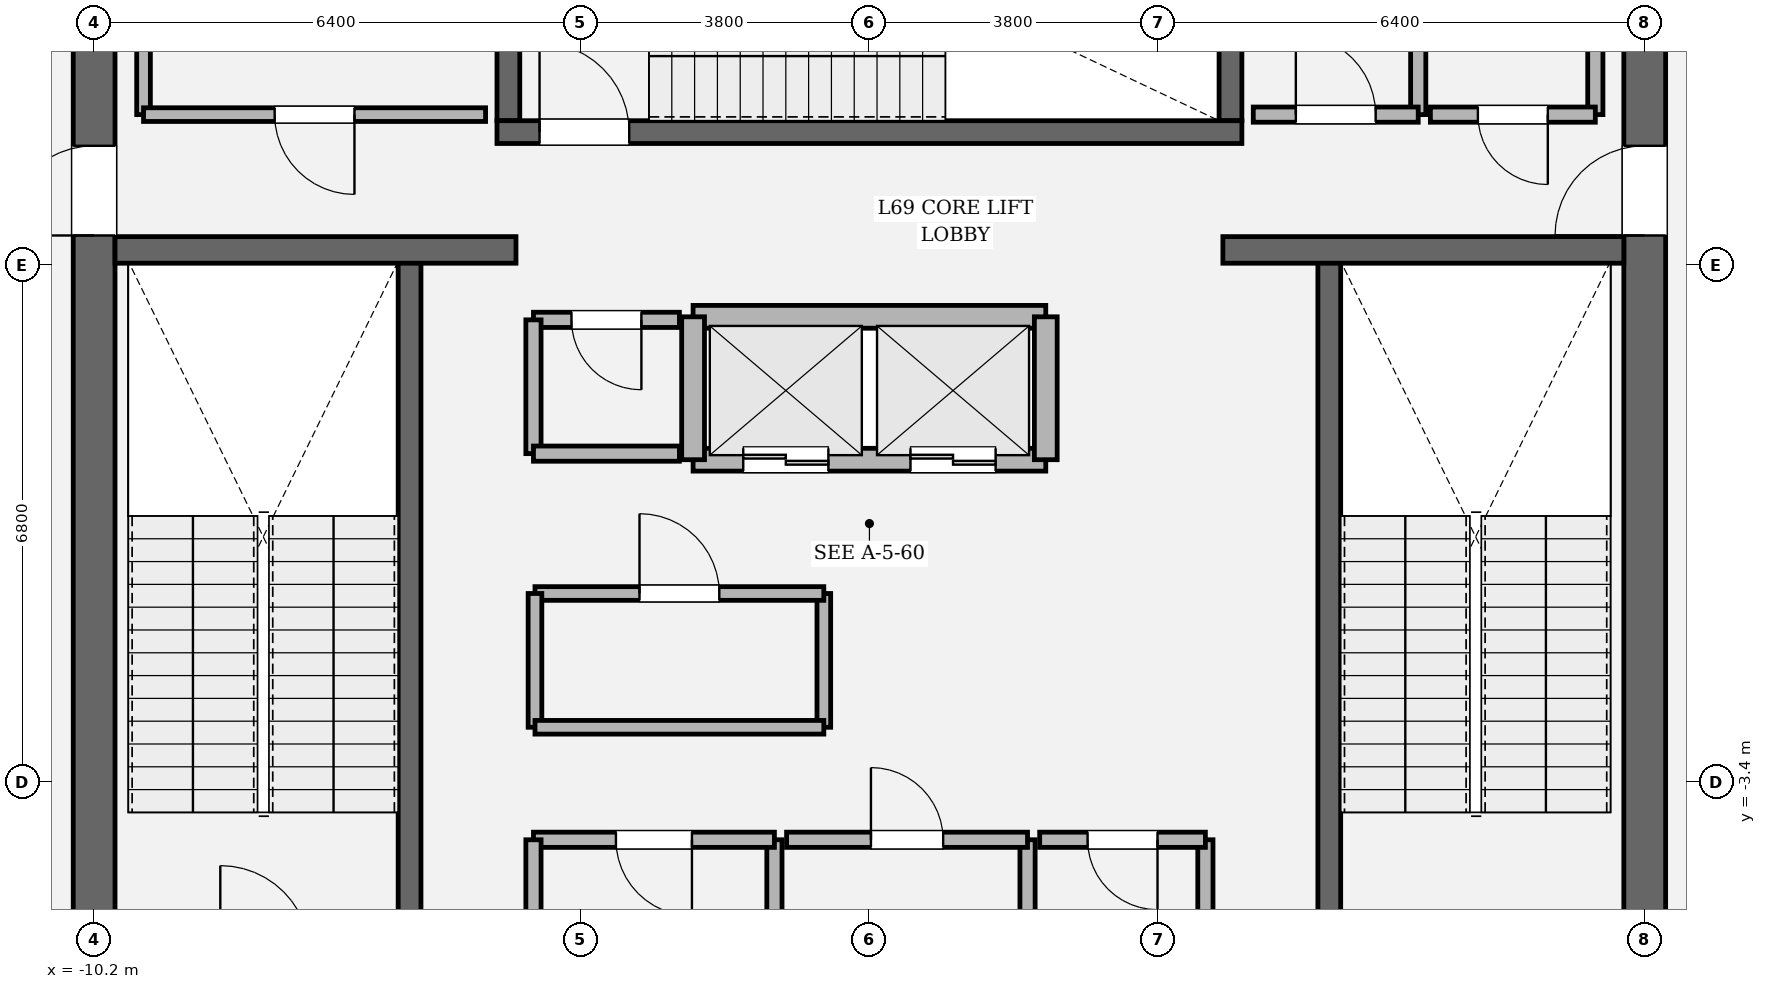
"""IFC4 building model, lengths in metres.
Left out: names, types, materials, properties, quantities, classifications, styles, units other than length and angle.
Written with IfcOpenShell. Run it as: python <this file> out.ifc"""

import sys

from ifc_helpers import new_model, si_unit, direction, frame, frame_2d, origin, place, context, subcontext, project, spatial, rectangle, extrude, element, fill, save


model = new_model("IFC4")
c1 = context("Model", 3, precision=1e-05, world=origin(), true_north=direction((0.0, 1.0)))
c2 = subcontext(c1, "Body", "Model", "MODEL_VIEW")
j1 = project(units=[si_unit("LENGTHUNIT", "METRE"), si_unit("PLANEANGLEUNIT", "RADIAN")], contexts=[c1])
p1 = place(None, origin())
s1 = spatial("IfcSite", under=j1, at=p1, CompositionType="ELEMENT")
p2 = place(p1, origin())
s2 = spatial("IfcBuilding", under=s1, at=p2, CompositionType="ELEMENT")
p3 = place(p2, frame((0.0, 0.0, 292.2)))
s3 = spatial("IfcBuildingStorey", under=s2, at=p3, CompositionType="ELEMENT", Elevation=292.2)
p4 = place(p3, frame((-10.2, -8.925, 0.0), z_axis=(0.0, 0.0, 1.0), x_axis=(0.0, 1.0, 0.0)))
e1 = element("IfcWall", 1, at=p4, inside=s3, PredefinedType="SHEAR", context=c2, shape_type="SweptSolid", body=[
    extrude(rectangle(XDim=17.85, YDim=0.55, at=frame_2d((8.925, 0.0))), origin(), (0.0, 0.0, 1.0), 4.2),
])
p5 = place(p4, frame((12.715, 0.0, 0.0)))
e2 = element("IfcOpeningElement", 2, at=p5, cuts=e1, PredefinedType="OPENING", context=c2, shape_type="SweptSolid", body=[
    extrude(rectangle(XDim=1.18, YDim=2.2, at=frame_2d((0.59, 1.1))), frame((0.0, 0.285, 0.0), z_axis=(0.0, -1.0, 0.0), x_axis=(1.0, 0.0, 0.0)), (0.0, 0.0, 1.0), 0.57),
])
p6 = place(p3, frame((10.2, 8.925, 0.0), z_axis=(0.0, 0.0, 1.0), x_axis=(0.0, -1.0, 0.0)))
e3 = element("IfcWall", 3, at=p6, inside=s3, PredefinedType="SHEAR", context=c2, shape_type="SweptSolid", body=[
    extrude(rectangle(XDim=17.85, YDim=0.55, at=frame_2d((8.925, 0.0))), origin(), (0.0, 0.0, 1.0), 4.2),
])
p7 = place(p6, frame((3.955, 0.0, 0.0)))
e4 = element("IfcOpeningElement", 4, at=p7, cuts=e3, PredefinedType="OPENING", context=c2, shape_type="SweptSolid", body=[
    extrude(rectangle(XDim=1.18, YDim=2.2, at=frame_2d((0.59, 1.1))), frame((0.0, 0.285, 0.0), z_axis=(0.0, -1.0, 0.0), x_axis=(1.0, 0.0, 0.0)), (0.0, 0.0, 1.0), 0.57),
])
for number, where, z_axis, x_axis in (
    (5, (-6.05, -5.5, 0.0), (0.0, 0.0, 1.0), (0.0, 1.0, 0.0)),
    (6, (6.05, 3.45, 0.0), (0.0, 0.0, 1.0), (0.0, -1.0, 0.0)),
):
    element("IfcWall", number, at=place(p3, frame(where, z_axis=z_axis, x_axis=x_axis)), inside=s3, PredefinedType="SOLIDWALL", context=c2, shape_type="SweptSolid", body=[
        extrude(rectangle(XDim=8.95, YDim=0.3, at=frame_2d((4.475, 0.0))), origin(), (0.0, 0.0, 1.0), 4.2),
    ])
for number, where, z_axis, x_axis in (
    (7, (-4.75, 5.3, 0.0), (0.0, 0.0, 1.0), (0.0, 1.0, 0.0)),
    (8, (4.75, 8.925, 0.0), (0.0, 0.0, 1.0), (0.0, -1.0, 0.0)),
):
    element("IfcWall", number, at=place(p3, frame(where, z_axis=z_axis, x_axis=x_axis)), inside=s3, PredefinedType="SOLIDWALL", context=c2, shape_type="SweptSolid", body=[
        extrude(rectangle(XDim=3.625, YDim=0.3, at=frame_2d((1.812, 0.0))), origin(), (0.0, 0.0, 1.0), 4.2),
    ])
p8 = place(p3, frame((-4.9, 5.15, 0.0), z_axis=(0.0, 0.0, 1.0), x_axis=(1.0, 0.0, 0.0)))
e9 = element("IfcWall", 9, at=p8, inside=s3, PredefinedType="SOLIDWALL", context=c2, shape_type="SweptSolid", body=[
    extrude(rectangle(XDim=9.8, YDim=0.3, at=frame_2d((4.9, 0.0))), origin(), (0.0, 0.0, 1.0), 4.2),
])
p9 = place(p8, frame((0.56, 0.0, 0.0)))
e10 = element("IfcOpeningElement", 10, at=p9, cuts=e9, PredefinedType="OPENING", context=c2, shape_type="SweptSolid", body=[
    extrude(rectangle(XDim=1.18, YDim=2.2, at=frame_2d((0.59, 1.1))), frame((0.0, 0.16, 0.0), z_axis=(0.0, -1.0, 0.0), x_axis=(1.0, 0.0, 0.0)), (0.0, 0.0, 1.0), 0.32),
])
for number, where, z_axis, x_axis in (
    (11, (-9.925, 3.6, 0.0), (0.0, 0.0, 1.0), (1.0, 0.0, 0.0)),
    (12, (4.65, 3.6, 0.0), (0.0, 0.0, 1.0), (1.0, 0.0, 0.0)),
):
    element("IfcWall", number, at=place(p3, frame(where, z_axis=z_axis, x_axis=x_axis)), inside=s3, PredefinedType="SOLIDWALL", context=c2, shape_type="SweptSolid", body=[
        extrude(rectangle(XDim=5.275, YDim=0.35, at=frame_2d((2.638, 0.0))), origin(), (0.0, 0.0, 1.0), 4.2),
    ])
p10 = place(p3, frame((-2.32, 0.84, 0.0), z_axis=(0.0, 0.0, 1.0), x_axis=(1.0, 0.0, 0.0)))
e13 = element("IfcWall", 13, at=p10, inside=s3, PredefinedType="SOLIDWALL", context=c2, shape_type="SweptSolid", body=[
    extrude(rectangle(XDim=4.64, YDim=0.3, at=frame_2d((2.32, 0.0))), origin(), (0.0, 0.0, 1.0), 4.0),
])
p11 = place(p10, frame((0.66, 0.0, 0.0)))
e14 = element("IfcOpeningElement", 14, at=p11, cuts=e13, PredefinedType="OPENING", context=c2, shape_type="SweptSolid", body=[
    extrude(rectangle(XDim=1.12, YDim=2.25, at=frame_2d((0.56, 1.125))), frame((0.0, 0.16, 0.0), z_axis=(0.0, -1.0, 0.0), x_axis=(1.0, 0.0, 0.0)), (0.0, 0.0, 1.0), 0.32),
])
p12 = place(p10, frame((2.86, 0.0, 0.0)))
e15 = element("IfcOpeningElement", 15, at=p12, cuts=e13, PredefinedType="OPENING", context=c2, shape_type="SweptSolid", body=[
    extrude(rectangle(XDim=1.12, YDim=2.25, at=frame_2d((0.56, 1.125))), frame((0.0, 0.16, 0.0), z_axis=(0.0, -1.0, 0.0), x_axis=(1.0, 0.0, 0.0)), (0.0, 0.0, 1.0), 0.32),
])
p13 = place(p3, frame((-2.32, 2.72, 0.0), z_axis=(0.0, 0.0, 1.0), x_axis=(1.0, 0.0, 0.0)))
e16 = element("IfcWall", 16, at=p13, inside=s3, PredefinedType="SOLIDWALL", context=c2, shape_type="SweptSolid", body=[
    extrude(rectangle(XDim=4.64, YDim=0.3, at=frame_2d((2.32, 0.0))), origin(), (0.0, 0.0, 1.0), 4.0),
])
for number, where, z_axis, x_axis in (
    (17, (-2.32, 0.84, 0.0), (0.0, 0.0, 1.0), (0.0, 1.0, 0.0)),
    (18, (2.32, 0.84, 0.0), (0.0, 0.0, 1.0), (0.0, 1.0, 0.0)),
):
    element("IfcWall", number, at=place(p3, frame(where, z_axis=z_axis, x_axis=x_axis)), inside=s3, PredefinedType="SOLIDWALL", context=c2, shape_type="SweptSolid", body=[
        extrude(rectangle(XDim=1.88, YDim=0.3, at=frame_2d((0.94, 0.0))), origin(), (0.0, 0.0, 1.0), 4.0),
    ])
p14 = place(p3, frame((-1.25, -5.9, 0.0), z_axis=(0.0, 0.0, 1.0), x_axis=(0.0, 1.0, 0.0)))
e19 = element("IfcWall", 19, at=p14, inside=s3, PredefinedType="SOLIDWALL", context=c2, shape_type="SweptSolid", body=[
    extrude(rectangle(XDim=1.74, YDim=0.2, at=frame_2d((0.87, 0.0))), origin(), (0.0, 0.0, 1.0), 4.0),
])
p15 = place(p3, frame((-1.25, -4.16, 0.0), z_axis=(0.0, 0.0, 1.0), x_axis=(-1.0, 0.0, 0.0)))
e20 = element("IfcWall", 20, at=p15, inside=s3, PredefinedType="SOLIDWALL", context=c2, shape_type="SweptSolid", body=[
    extrude(rectangle(XDim=3.17, YDim=0.2, at=frame_2d((1.585, 0.0))), origin(), (0.0, 0.0, 1.0), 4.0),
])
p16 = place(p15, frame((1.085, 0.0, 0.0)))
e21 = element("IfcOpeningElement", 21, at=p16, cuts=e20, PredefinedType="OPENING", context=c2, shape_type="SweptSolid", body=[
    extrude(rectangle(XDim=1.0, YDim=2.15, at=frame_2d((0.5, 1.075))), frame((0.0, 0.11, 0.0), z_axis=(0.0, -1.0, 0.0), x_axis=(1.0, 0.0, 0.0)), (0.0, 0.0, 1.0), 0.22),
])
for number, where, z_axis, x_axis in (
    (22, (-4.42, -4.16, 0.0), (0.0, 0.0, 1.0), (0.0, -1.0, 0.0)),
    (23, (2.08, -5.9, 0.0), (0.0, 0.0, 1.0), (0.0, 1.0, 0.0)),
):
    element("IfcWall", number, at=place(p3, frame(where, z_axis=z_axis, x_axis=x_axis)), inside=s3, PredefinedType="SOLIDWALL", context=c2, shape_type="SweptSolid", body=[
        extrude(rectangle(XDim=1.74, YDim=0.2, at=frame_2d((0.87, 0.0))), origin(), (0.0, 0.0, 1.0), 4.0),
    ])
p17 = place(p3, frame((2.08, -4.16, 0.0), z_axis=(0.0, 0.0, 1.0), x_axis=(-1.0, 0.0, 0.0)))
e24 = element("IfcWall", 24, at=p17, inside=s3, PredefinedType="SOLIDWALL", context=c2, shape_type="SweptSolid", body=[
    extrude(rectangle(XDim=3.17, YDim=0.2, at=frame_2d((1.585, 0.0))), origin(), (0.0, 0.0, 1.0), 4.0),
])
p18 = place(p17, frame((1.11, 0.0, 0.0)))
e25 = element("IfcOpeningElement", 25, at=p18, cuts=e24, PredefinedType="OPENING", context=c2, shape_type="SweptSolid", body=[
    extrude(rectangle(XDim=0.95, YDim=2.15, at=frame_2d((0.475, 1.075))), frame((0.0, 0.11, 0.0), z_axis=(0.0, -1.0, 0.0), x_axis=(1.0, 0.0, 0.0)), (0.0, 0.0, 1.0), 0.22),
])
p19 = place(p3, frame((4.42, -5.9, 0.0), z_axis=(0.0, 0.0, 1.0), x_axis=(0.0, 1.0, 0.0)))
e26 = element("IfcWall", 26, at=p19, inside=s3, PredefinedType="SOLIDWALL", context=c2, shape_type="SweptSolid", body=[
    extrude(rectangle(XDim=1.74, YDim=0.2, at=frame_2d((0.87, 0.0))), origin(), (0.0, 0.0, 1.0), 4.0),
])
p20 = place(p3, frame((4.42, -4.16, 0.0), z_axis=(0.0, 0.0, 1.0), x_axis=(-1.0, 0.0, 0.0)))
e27 = element("IfcWall", 27, at=p20, inside=s3, PredefinedType="SOLIDWALL", context=c2, shape_type="SweptSolid", body=[
    extrude(rectangle(XDim=2.18, YDim=0.2, at=frame_2d((1.09, 0.0))), origin(), (0.0, 0.0, 1.0), 4.0),
])
p21 = place(p20, frame((0.63, 0.0, 0.0)))
e28 = element("IfcOpeningElement", 28, at=p21, cuts=e27, PredefinedType="OPENING", context=c2, shape_type="SweptSolid", body=[
    extrude(rectangle(XDim=0.92, YDim=2.1, at=frame_2d((0.46, 1.05))), frame((0.0, 0.11, 0.0), z_axis=(0.0, -1.0, 0.0), x_axis=(1.0, 0.0, 0.0)), (0.0, 0.0, 1.0), 0.22),
])
p22 = place(p3, frame((-0.6, -2.68, 0.0), z_axis=(0.0, 0.0, 1.0), x_axis=(0.0, 1.0, 0.0)))
e29 = element("IfcWall", 29, at=p22, inside=s3, PredefinedType="PARTITIONING", context=c2, shape_type="SweptSolid", body=[
    extrude(rectangle(XDim=1.76, YDim=0.18, at=frame_2d((0.88, 0.0))), origin(), (0.0, 0.0, 1.0), 4.0),
])
p23 = place(p3, frame((-0.6, -0.92, 0.0), z_axis=(0.0, 0.0, 1.0), x_axis=(-1.0, 0.0, 0.0)))
e30 = element("IfcWall", 30, at=p23, inside=s3, PredefinedType="PARTITIONING", context=c2, shape_type="SweptSolid", body=[
    extrude(rectangle(XDim=3.8, YDim=0.18, at=frame_2d((1.9, 0.0))), origin(), (0.0, 0.0, 1.0), 4.0),
])
p24 = place(p23, frame((1.375, 0.0, 0.0)))
e31 = element("IfcOpeningElement", 31, at=p24, cuts=e30, PredefinedType="OPENING", context=c2, shape_type="SweptSolid", body=[
    extrude(rectangle(XDim=1.05, YDim=2.2, at=frame_2d((0.525, 1.1))), frame((0.0, 0.1, 0.0), z_axis=(0.0, -1.0, 0.0), x_axis=(1.0, 0.0, 0.0)), (0.0, 0.0, 1.0), 0.2),
])
p25 = place(p3, frame((-4.4, -0.92, 0.0), z_axis=(0.0, 0.0, 1.0), x_axis=(0.0, -1.0, 0.0)))
e32 = element("IfcWall", 32, at=p25, inside=s3, PredefinedType="PARTITIONING", context=c2, shape_type="SweptSolid", body=[
    extrude(rectangle(XDim=1.76, YDim=0.18, at=frame_2d((0.88, 0.0))), origin(), (0.0, 0.0, 1.0), 4.0),
])
p26 = place(p3, frame((-4.4, -2.68, 0.0), z_axis=(0.0, 0.0, 1.0), x_axis=(1.0, 0.0, 0.0)))
e33 = element("IfcWall", 33, at=p26, inside=s3, PredefinedType="PARTITIONING", context=c2, shape_type="SweptSolid", body=[
    extrude(rectangle(XDim=3.8, YDim=0.18, at=frame_2d((1.9, 0.0))), origin(), (0.0, 0.0, 1.0), 4.0),
])
p27 = place(p3, frame((-2.5, 2.68, 0.0), z_axis=(0.0, 0.0, 1.0), x_axis=(-1.0, 0.0, 0.0)))
e34 = element("IfcWall", 34, at=p27, inside=s3, PredefinedType="SOLIDWALL", context=c2, shape_type="SweptSolid", body=[
    extrude(rectangle(XDim=1.92, YDim=0.2, at=frame_2d((0.96, 0.0))), origin(), (0.0, 0.0, 1.0), 4.0),
])
p28 = place(p27, frame((0.5, 0.0, 0.0)))
e35 = element("IfcOpeningElement", 35, at=p28, cuts=e34, PredefinedType="OPENING", context=c2, shape_type="SweptSolid", body=[
    extrude(rectangle(XDim=0.92, YDim=2.1, at=frame_2d((0.46, 1.05))), frame((0.0, 0.11, 0.0), z_axis=(0.0, -1.0, 0.0), x_axis=(1.0, 0.0, 0.0)), (0.0, 0.0, 1.0), 0.22),
])
p29 = place(p3, frame((-4.42, 2.68, 0.0), z_axis=(0.0, 0.0, 1.0), x_axis=(0.0, -1.0, 0.0)))
e36 = element("IfcWall", 36, at=p29, inside=s3, PredefinedType="SOLIDWALL", context=c2, shape_type="SweptSolid", body=[
    extrude(rectangle(XDim=1.76, YDim=0.2, at=frame_2d((0.88, 0.0))), origin(), (0.0, 0.0, 1.0), 4.0),
])
p30 = place(p3, frame((-4.42, 0.92, 0.0), z_axis=(0.0, 0.0, 1.0), x_axis=(1.0, 0.0, 0.0)))
e37 = element("IfcWall", 37, at=p30, inside=s3, PredefinedType="SOLIDWALL", context=c2, shape_type="SweptSolid", body=[
    extrude(rectangle(XDim=1.92, YDim=0.2, at=frame_2d((0.96, 0.0))), origin(), (0.0, 0.0, 1.0), 4.0),
])
p31 = place(p3, frame((-9.55, 8.65, 0.0), z_axis=(0.0, 0.0, 1.0), x_axis=(0.0, -1.0, 0.0)))
e38 = element("IfcWall", 38, at=p31, inside=s3, PredefinedType="PARTITIONING", context=c2, shape_type="SweptSolid", body=[
    extrude(rectangle(XDim=3.27, YDim=0.18, at=frame_2d((1.635, 0.0))), origin(), (0.0, 0.0, 1.0), 4.0),
])
p32 = place(p3, frame((-9.55, 5.38, 0.0), z_axis=(0.0, 0.0, 1.0), x_axis=(1.0, 0.0, 0.0)))
e39 = element("IfcWall", 39, at=p32, inside=s3, PredefinedType="PARTITIONING", context=c2, shape_type="SweptSolid", body=[
    extrude(rectangle(XDim=4.5, YDim=0.18, at=frame_2d((2.25, 0.0))), origin(), (0.0, 0.0, 1.0), 4.0),
])
p33 = place(p32, frame((1.725, 0.0, 0.0)))
e40 = element("IfcOpeningElement", 40, at=p33, cuts=e39, PredefinedType="OPENING", context=c2, shape_type="SweptSolid", body=[
    extrude(rectangle(XDim=1.05, YDim=2.2, at=frame_2d((0.525, 1.1))), frame((0.0, 0.1, 0.0), z_axis=(0.0, -1.0, 0.0), x_axis=(1.0, 0.0, 0.0)), (0.0, 0.0, 1.0), 0.2),
])
p34 = place(p3, frame((7.22, 5.38, 0.0), z_axis=(0.0, 0.0, 1.0), x_axis=(0.0, 1.0, 0.0)))
e41 = element("IfcWall", 41, at=p34, inside=s3, PredefinedType="SOLIDWALL", context=c2, shape_type="SweptSolid", body=[
    extrude(rectangle(XDim=3.27, YDim=0.2, at=frame_2d((1.635, 0.0))), origin(), (0.0, 0.0, 1.0), 4.0),
])
p35 = place(p3, frame((5.05, 5.38, 0.0), z_axis=(0.0, 0.0, 1.0), x_axis=(1.0, 0.0, 0.0)))
e42 = element("IfcWall", 42, at=p35, inside=s3, PredefinedType="SOLIDWALL", context=c2, shape_type="SweptSolid", body=[
    extrude(rectangle(XDim=2.17, YDim=0.2, at=frame_2d((1.085, 0.0))), origin(), (0.0, 0.0, 1.0), 4.0),
])
p36 = place(p35, frame((0.56, 0.0, 0.0)))
e43 = element("IfcOpeningElement", 43, at=p36, cuts=e42, PredefinedType="OPENING", context=c2, shape_type="SweptSolid", body=[
    extrude(rectangle(XDim=1.05, YDim=2.2, at=frame_2d((0.525, 1.1))), frame((0.0, 0.11, 0.0), z_axis=(0.0, -1.0, 0.0), x_axis=(1.0, 0.0, 0.0)), (0.0, 0.0, 1.0), 0.22),
])
p37 = place(p3, frame((9.55, 5.38, 0.0), z_axis=(0.0, 0.0, 1.0), x_axis=(0.0, 1.0, 0.0)))
e44 = element("IfcWall", 44, at=p37, inside=s3, PredefinedType="SOLIDWALL", context=c2, shape_type="SweptSolid", body=[
    extrude(rectangle(XDim=3.27, YDim=0.2, at=frame_2d((1.635, 0.0))), origin(), (0.0, 0.0, 1.0), 4.0),
])
p38 = place(p3, frame((7.38, 5.38, 0.0), z_axis=(0.0, 0.0, 1.0), x_axis=(1.0, 0.0, 0.0)))
e45 = element("IfcWall", 45, at=p38, inside=s3, PredefinedType="SOLIDWALL", context=c2, shape_type="SweptSolid", body=[
    extrude(rectangle(XDim=2.17, YDim=0.2, at=frame_2d((1.085, 0.0))), origin(), (0.0, 0.0, 1.0), 4.0),
])
p39 = place(p38, frame((0.625, 0.0, 0.0)))
e46 = element("IfcOpeningElement", 46, at=p39, cuts=e45, PredefinedType="OPENING", context=c2, shape_type="SweptSolid", body=[
    extrude(rectangle(XDim=0.92, YDim=2.1, at=frame_2d((0.46, 1.05))), frame((0.0, 0.11, 0.0), z_axis=(0.0, -1.0, 0.0), x_axis=(1.0, 0.0, 0.0)), (0.0, 0.0, 1.0), 0.22),
])
p40 = place(p9, origin())
e47 = element("IfcDoor", 47, at=p40, inside=s3, OperationType="SINGLE_SWING_LEFT", PredefinedType="DOOR", context=c2, shape_type="SweptSolid", body=[
    extrude(rectangle(XDim=1.18, YDim=2.2, at=frame_2d((0.59, 1.1))), frame((0.0, 0.025, 0.0), z_axis=(0.0, -1.0, 0.0), x_axis=(1.0, 0.0, 0.0)), (0.0, 0.0, 1.0), 0.05),
])
fill(e10, e47)
p41 = place(p5, origin())
e48 = element("IfcDoor", 48, at=p41, inside=s3, OperationType="SINGLE_SWING_LEFT", PredefinedType="DOOR", context=c2, shape_type="SweptSolid", body=[
    extrude(rectangle(XDim=1.18, YDim=2.2, at=frame_2d((0.59, 1.1))), frame((0.0, 0.025, 0.0), z_axis=(0.0, -1.0, 0.0), x_axis=(1.0, 0.0, 0.0)), (0.0, 0.0, 1.0), 0.05),
])
fill(e2, e48)
p42 = place(p7, origin())
e49 = element("IfcDoor", 49, at=p42, inside=s3, OperationType="SINGLE_SWING_RIGHT", PredefinedType="DOOR", context=c2, shape_type="SweptSolid", body=[
    extrude(rectangle(XDim=1.18, YDim=2.2, at=frame_2d((0.59, 1.1))), frame((0.0, 0.025, 0.0), z_axis=(0.0, -1.0, 0.0), x_axis=(1.0, 0.0, 0.0)), (0.0, 0.0, 1.0), 0.05),
])
fill(e4, e49)
p43 = place(p11, origin())
e50 = element("IfcDoor", 50, at=p43, inside=s3, OperationType="DOUBLE_DOOR_SLIDING", PredefinedType="DOOR", context=c2, shape_type="SweptSolid", body=[
    extrude(rectangle(XDim=1.12, YDim=2.25, at=frame_2d((0.56, 1.125))), frame((0.0, 0.025, 0.0), z_axis=(0.0, -1.0, 0.0), x_axis=(1.0, 0.0, 0.0)), (0.0, 0.0, 1.0), 0.05),
])
fill(e14, e50)
p44 = place(p12, origin())
e51 = element("IfcDoor", 51, at=p44, inside=s3, OperationType="DOUBLE_DOOR_SLIDING", PredefinedType="DOOR", context=c2, shape_type="SweptSolid", body=[
    extrude(rectangle(XDim=1.12, YDim=2.25, at=frame_2d((0.56, 1.125))), frame((0.0, 0.025, 0.0), z_axis=(0.0, -1.0, 0.0), x_axis=(1.0, 0.0, 0.0)), (0.0, 0.0, 1.0), 0.05),
])
fill(e15, e51)
p45 = place(p16, origin())
e52 = element("IfcDoor", 52, at=p45, inside=s3, OperationType="SINGLE_SWING_LEFT", PredefinedType="DOOR", context=c2, shape_type="SweptSolid", body=[
    extrude(rectangle(XDim=1.0, YDim=2.15, at=frame_2d((0.5, 1.075))), frame((0.0, 0.025, 0.0), z_axis=(0.0, -1.0, 0.0), x_axis=(1.0, 0.0, 0.0)), (0.0, 0.0, 1.0), 0.05),
])
fill(e21, e52)
p46 = place(p18, origin())
e53 = element("IfcDoor", 53, at=p46, inside=s3, OperationType="SINGLE_SWING_RIGHT", PredefinedType="DOOR", context=c2, shape_type="SweptSolid", body=[
    extrude(rectangle(XDim=0.95, YDim=2.15, at=frame_2d((0.475, 1.075))), frame((0.0, 0.025, 0.0), z_axis=(0.0, -1.0, 0.0), x_axis=(1.0, 0.0, 0.0)), (0.0, 0.0, 1.0), 0.05),
])
fill(e25, e53)
p47 = place(p21, origin())
e54 = element("IfcDoor", 54, at=p47, inside=s3, OperationType="SINGLE_SWING_LEFT", PredefinedType="DOOR", context=c2, shape_type="SweptSolid", body=[
    extrude(rectangle(XDim=0.92, YDim=2.1, at=frame_2d((0.46, 1.05))), frame((0.0, 0.025, 0.0), z_axis=(0.0, -1.0, 0.0), x_axis=(1.0, 0.0, 0.0)), (0.0, 0.0, 1.0), 0.05),
])
fill(e28, e54)
p48 = place(p24, origin())
e55 = element("IfcDoor", 55, at=p48, inside=s3, OperationType="SINGLE_SWING_RIGHT", PredefinedType="DOOR", context=c2, shape_type="SweptSolid", body=[
    extrude(rectangle(XDim=1.05, YDim=2.2, at=frame_2d((0.525, 1.1))), frame((0.0, 0.025, 0.0), z_axis=(0.0, -1.0, 0.0), x_axis=(1.0, 0.0, 0.0)), (0.0, 0.0, 1.0), 0.05),
])
fill(e31, e55)
p49 = place(p28, origin())
e56 = element("IfcDoor", 56, at=p49, inside=s3, OperationType="SINGLE_SWING_LEFT", PredefinedType="DOOR", context=c2, shape_type="SweptSolid", body=[
    extrude(rectangle(XDim=0.92, YDim=2.1, at=frame_2d((0.46, 1.05))), frame((0.0, 0.025, 0.0), z_axis=(0.0, -1.0, 0.0), x_axis=(1.0, 0.0, 0.0)), (0.0, 0.0, 1.0), 0.05),
])
fill(e35, e56)
p50 = place(p33, origin())
e57 = element("IfcDoor", 57, at=p50, inside=s3, OperationType="SINGLE_SWING_RIGHT", PredefinedType="DOOR", context=c2, shape_type="SweptSolid", body=[
    extrude(rectangle(XDim=1.05, YDim=2.2, at=frame_2d((0.525, 1.1))), frame((0.0, 0.025, 0.0), z_axis=(0.0, -1.0, 0.0), x_axis=(1.0, 0.0, 0.0)), (0.0, 0.0, 1.0), 0.05),
])
fill(e40, e57)
p51 = place(p36, origin())
e58 = element("IfcDoor", 58, at=p51, inside=s3, OperationType="SINGLE_SWING_LEFT", PredefinedType="DOOR", context=c2, shape_type="SweptSolid", body=[
    extrude(rectangle(XDim=1.05, YDim=2.2, at=frame_2d((0.525, 1.1))), frame((0.0, 0.025, 0.0), z_axis=(0.0, -1.0, 0.0), x_axis=(1.0, 0.0, 0.0)), (0.0, 0.0, 1.0), 0.05),
])
fill(e43, e58)
p52 = place(p39, origin())
e59 = element("IfcDoor", 59, at=p52, inside=s3, OperationType="SINGLE_SWING_RIGHT", PredefinedType="DOOR", context=c2, shape_type="SweptSolid", body=[
    extrude(rectangle(XDim=0.92, YDim=2.1, at=frame_2d((0.46, 1.05))), frame((0.0, 0.025, 0.0), z_axis=(0.0, -1.0, 0.0), x_axis=(1.0, 0.0, 0.0)), (0.0, 0.0, 1.0), 0.05),
])
fill(e46, e59)
save(model, sys.argv[1])
